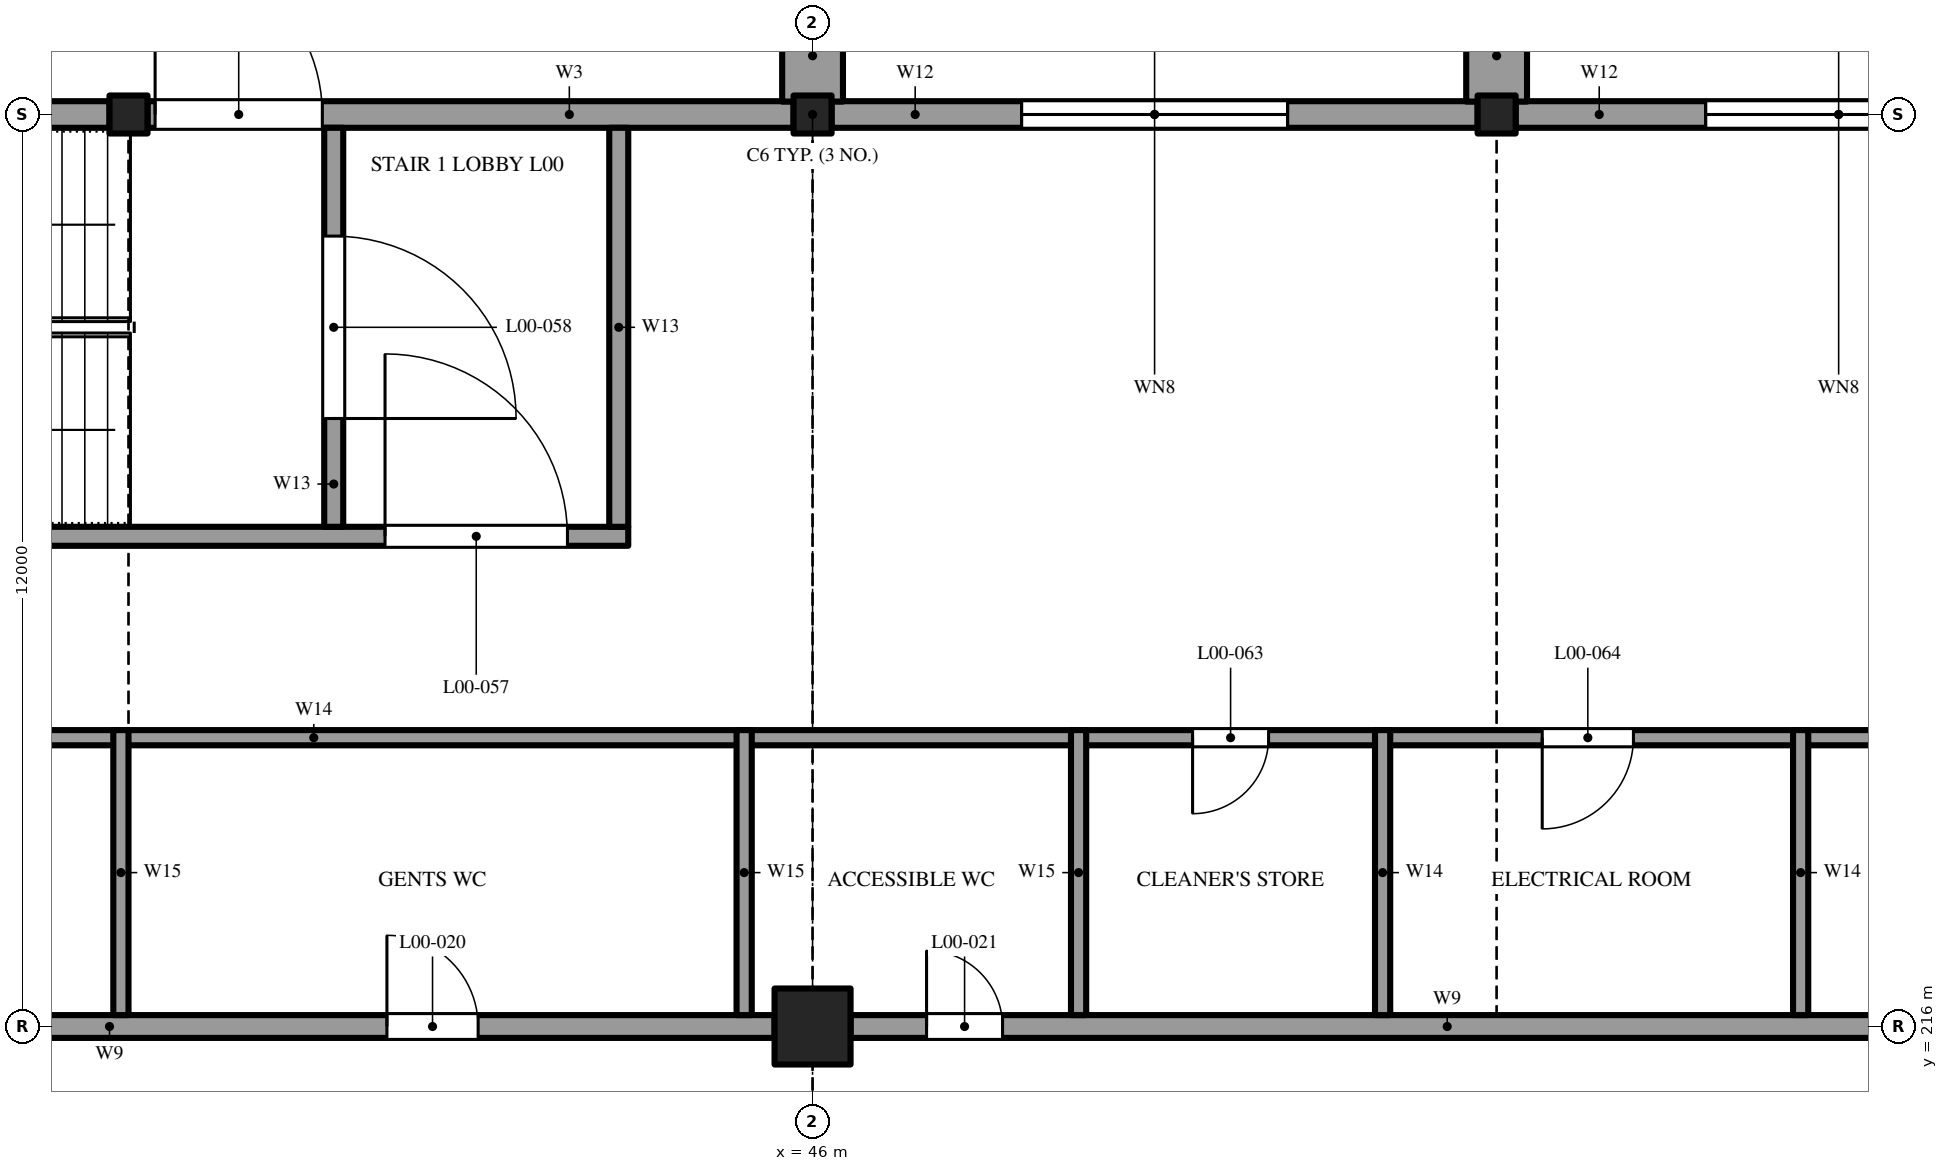
"""IFC4 building model, lengths in metres.
Left out: names, types, materials, properties, quantities, classifications, styles, units other than length and angle.
Written with IfcOpenShell. Run it as: python <this file> out.ifc"""

import sys

from ifc_helpers import new_model, si_unit, direction, frame, frame_2d, origin, origin_2d, place, context, subcontext, project, spatial, rectangle, extrude, element, fill, save


model = new_model("IFC4")
c1 = context("Model", 3, precision=1e-05, world=origin(), true_north=direction((0.0, 1.0)))
c2 = subcontext(c1, "Body", "Model", "MODEL_VIEW")
j1 = project(units=[si_unit("LENGTHUNIT", "METRE"), si_unit("PLANEANGLEUNIT", "RADIAN")], contexts=[c1])
p1 = place(None, origin())
s1 = spatial("IfcSite", under=j1, at=p1, CompositionType="ELEMENT")
p2 = place(p1, origin())
s2 = spatial("IfcBuilding", under=s1, at=p2, CompositionType="ELEMENT")
p3 = place(p2, origin())
s3 = spatial("IfcBuildingStorey", under=s2, at=p3, CompositionType="ELEMENT", Elevation=0.0)
p4 = place(p3, frame((46.0, 216.0, -0.4), z_axis=(0.0, 0.0, 1.0), x_axis=(1.0, 0.0, 0.0)))
e1 = element("IfcColumn", 1, at=p4, inside=s3, PredefinedType="COLUMN", context=c2, shape_type="SweptSolid", body=[
    extrude(rectangle(XDim=1.0, YDim=1.0, at=origin_2d()), origin(), (0.0, 0.0, 1.0), 7.6),
])
for number, where, z_axis, x_axis in (
    (2, (37.0, 228.0, -0.4), (0.0, 0.0, 1.0), (1.0, 0.0, 0.0)),
    (3, (46.0, 228.0, -0.4), (0.0, 0.0, 1.0), (1.0, 0.0, 0.0)),
    (4, (55.0, 228.0, -0.4), (0.0, 0.0, 1.0), (1.0, 0.0, 0.0)),
):
    element("IfcColumn", number, at=place(p3, frame(where, z_axis=z_axis, x_axis=x_axis)), inside=s3, PredefinedType="COLUMN", context=c2, shape_type="SweptSolid", body=[
        extrude(rectangle(XDim=0.5, YDim=0.5, at=origin_2d()), origin(), (0.0, 0.0, 1.0), 7.6),
    ])
p5 = place(p3, frame((28.5, 216.0, 0.0), z_axis=(0.0, 0.0, 1.0), x_axis=(1.0, 0.0, 0.0)))
e5 = element("IfcWall", 5, at=p5, inside=s3, PredefinedType="SOLIDWALL", context=c2, shape_type="SweptSolid", body=[
    extrude(rectangle(XDim=17.0, YDim=0.3, at=frame_2d((8.5, 0.0))), origin(), (0.0, 0.0, 1.0), 6.8),
])
p6 = place(p5, frame((3.4, 0.0, 0.0)))
e6 = element("IfcOpeningElement", 6, at=p6, cuts=e5, PredefinedType="OPENING", context=c2, shape_type="SweptSolid", body=[
    extrude(rectangle(XDim=1.2, YDim=2.2, at=frame_2d((0.6, 1.1))), frame((0.0, 0.16, 0.0), z_axis=(0.0, -1.0, 0.0), x_axis=(1.0, 0.0, 0.0)), (0.0, 0.0, 1.0), 0.32),
])
p7 = place(p5, frame((11.9, 0.0, 0.0)))
e7 = element("IfcOpeningElement", 7, at=p7, cuts=e5, PredefinedType="OPENING", context=c2, shape_type="SweptSolid", body=[
    extrude(rectangle(XDim=1.2, YDim=2.2, at=frame_2d((0.6, 1.1))), frame((0.0, 0.16, 0.0), z_axis=(0.0, -1.0, 0.0), x_axis=(1.0, 0.0, 0.0)), (0.0, 0.0, 1.0), 0.32),
])
p8 = place(p3, frame((46.5, 216.0, 0.0), z_axis=(0.0, 0.0, 1.0), x_axis=(1.0, 0.0, 0.0)))
e8 = element("IfcWall", 8, at=p8, inside=s3, PredefinedType="SOLIDWALL", context=c2, shape_type="SweptSolid", body=[
    extrude(rectangle(XDim=17.0, YDim=0.3, at=frame_2d((8.5, 0.0))), origin(), (0.0, 0.0, 1.0), 6.8),
])
p9 = place(p8, frame((1.0, 0.0, 0.0)))
e9 = element("IfcOpeningElement", 9, at=p9, cuts=e8, PredefinedType="OPENING", context=c2, shape_type="SweptSolid", body=[
    extrude(rectangle(XDim=1.0, YDim=2.2, at=frame_2d((0.5, 1.1))), frame((0.0, 0.16, 0.0), z_axis=(0.0, -1.0, 0.0), x_axis=(1.0, 0.0, 0.0)), (0.0, 0.0, 1.0), 0.32),
])
p10 = place(p8, frame((13.7, 0.0, 0.0)))
e10 = element("IfcOpeningElement", 10, at=p10, cuts=e8, PredefinedType="OPENING", context=c2, shape_type="SweptSolid", body=[
    extrude(rectangle(XDim=1.2, YDim=2.2, at=frame_2d((0.6, 1.1))), frame((0.0, 0.16, 0.0), z_axis=(0.0, -1.0, 0.0), x_axis=(1.0, 0.0, 0.0)), (0.0, 0.0, 1.0), 0.32),
])
p11 = place(p3, frame((28.25, 228.0, 0.0), z_axis=(0.0, 0.0, 1.0), x_axis=(1.0, 0.0, 0.0)))
e11 = element("IfcWall", 11, at=p11, inside=s3, PredefinedType="SOLIDWALL", context=c2, shape_type="SweptSolid", body=[
    extrude(rectangle(XDim=8.5, YDim=0.35, at=frame_2d((4.25, 0.0))), origin(), (0.0, 0.0, 1.0), 6.8),
])
p12 = place(p3, frame((37.25, 228.0, 0.0), z_axis=(0.0, 0.0, 1.0), x_axis=(1.0, 0.0, 0.0)))
e12 = element("IfcWall", 12, at=p12, inside=s3, PredefinedType="SOLIDWALL", context=c2, shape_type="SweptSolid", body=[
    extrude(rectangle(XDim=8.5, YDim=0.35, at=frame_2d((4.25, 0.0))), origin(), (0.0, 0.0, 1.0), 6.8),
])
p13 = place(p12, frame((0.1, 0.0, 0.0)))
e13 = element("IfcOpeningElement", 13, at=p13, cuts=e12, PredefinedType="OPENING", context=c2, shape_type="SweptSolid", body=[
    extrude(rectangle(XDim=2.2, YDim=2.2, at=frame_2d((1.1, 1.1))), frame((0.0, 0.185, 0.0), z_axis=(0.0, -1.0, 0.0), x_axis=(1.0, 0.0, 0.0)), (0.0, 0.0, 1.0), 0.37),
])
p14 = place(p3, frame((46.25, 228.0, 0.0), z_axis=(0.0, 0.0, 1.0), x_axis=(1.0, 0.0, 0.0)))
e14 = element("IfcWall", 14, at=p14, inside=s3, PredefinedType="SOLIDWALL", context=c2, shape_type="SweptSolid", body=[
    extrude(rectangle(XDim=8.5, YDim=0.35, at=frame_2d((4.25, 0.0))), origin(), (0.0, 0.0, 1.0), 6.8),
])
p15 = place(p14, frame((2.5, 0.0, 0.0)))
e15 = element("IfcOpeningElement", 15, at=p15, cuts=e14, PredefinedType="OPENING", context=c2, shape_type="SweptSolid", body=[
    extrude(rectangle(XDim=3.5, YDim=4.2, at=frame_2d((1.75, 2.1))), frame((0.0, 0.185, 0.0), z_axis=(0.0, -1.0, 0.0), x_axis=(1.0, 0.0, 0.0)), (0.0, 0.0, 1.0), 0.37),
])
p16 = place(p14, frame((2.5, 0.0, 4.9)))
e16 = element("IfcOpeningElement", 16, at=p16, cuts=e14, PredefinedType="OPENING", context=c2, shape_type="SweptSolid", body=[
    extrude(rectangle(XDim=3.5, YDim=1.7, at=frame_2d((1.75, 0.85))), frame((0.0, 0.185, 0.0), z_axis=(0.0, -1.0, 0.0), x_axis=(1.0, 0.0, 0.0)), (0.0, 0.0, 1.0), 0.37),
])
p17 = place(p3, frame((55.25, 228.0, 0.0), z_axis=(0.0, 0.0, 1.0), x_axis=(1.0, 0.0, 0.0)))
e17 = element("IfcWall", 17, at=p17, inside=s3, PredefinedType="SOLIDWALL", context=c2, shape_type="SweptSolid", body=[
    extrude(rectangle(XDim=8.5, YDim=0.35, at=frame_2d((4.25, 0.0))), origin(), (0.0, 0.0, 1.0), 6.8),
])
p18 = place(p17, frame((2.5, 0.0, 0.0)))
e18 = element("IfcOpeningElement", 18, at=p18, cuts=e17, PredefinedType="OPENING", context=c2, shape_type="SweptSolid", body=[
    extrude(rectangle(XDim=3.5, YDim=4.2, at=frame_2d((1.75, 2.1))), frame((0.0, 0.185, 0.0), z_axis=(0.0, -1.0, 0.0), x_axis=(1.0, 0.0, 0.0)), (0.0, 0.0, 1.0), 0.37),
])
p19 = place(p17, frame((2.5, 0.0, 4.9)))
e19 = element("IfcOpeningElement", 19, at=p19, cuts=e17, PredefinedType="OPENING", context=c2, shape_type="SweptSolid", body=[
    extrude(rectangle(XDim=3.5, YDim=1.7, at=frame_2d((1.75, 0.85))), frame((0.0, 0.185, 0.0), z_axis=(0.0, -1.0, 0.0), x_axis=(1.0, 0.0, 0.0)), (0.0, 0.0, 1.0), 0.37),
])
p20 = place(p3, frame((28.175, 222.45, 0.0), z_axis=(0.0, 0.0, 1.0), x_axis=(1.0, 0.0, 0.0)))
e20 = element("IfcWall", 20, at=p20, inside=s3, PredefinedType="SOLIDWALL", context=c2, shape_type="SweptSolid", body=[
    extrude(rectangle(XDim=15.4, YDim=0.25, at=frame_2d((7.7, 0.0))), origin(), (0.0, 0.0, 1.0), 6.8),
])
p21 = place(p20, frame((12.2, 0.0, 0.0)))
e21 = element("IfcOpeningElement", 21, at=p21, cuts=e20, PredefinedType="OPENING", context=c2, shape_type="SweptSolid", body=[
    extrude(rectangle(XDim=2.4, YDim=2.2, at=frame_2d((1.2, 1.1))), frame((0.0, 0.135, 0.0), z_axis=(0.0, -1.0, 0.0), x_axis=(1.0, 0.0, 0.0)), (0.0, 0.0, 1.0), 0.27),
])
p22 = place(p3, frame((39.7, 222.575, 0.0), z_axis=(0.0, 0.0, 1.0), x_axis=(0.0, 1.0, 0.0)))
e22 = element("IfcWall", 22, at=p22, inside=s3, PredefinedType="SOLIDWALL", context=c2, shape_type="SweptSolid", body=[
    extrude(rectangle(XDim=5.25, YDim=0.25, at=frame_2d((2.625, 0.0))), origin(), (0.0, 0.0, 1.0), 6.8),
])
p23 = place(p22, frame((1.425, 0.0, 0.0)))
e23 = element("IfcOpeningElement", 23, at=p23, cuts=e22, PredefinedType="OPENING", context=c2, shape_type="SweptSolid", body=[
    extrude(rectangle(XDim=2.4, YDim=2.2, at=frame_2d((1.2, 1.1))), frame((0.0, 0.135, 0.0), z_axis=(0.0, -1.0, 0.0), x_axis=(1.0, 0.0, 0.0)), (0.0, 0.0, 1.0), 0.27),
])
p24 = place(p3, frame((43.45, 222.575, 0.0), z_axis=(0.0, 0.0, 1.0), x_axis=(0.0, 1.0, 0.0)))
e24 = element("IfcWall", 24, at=p24, inside=s3, PredefinedType="SOLIDWALL", context=c2, shape_type="SweptSolid", body=[
    extrude(rectangle(XDim=5.25, YDim=0.25, at=frame_2d((2.625, 0.0))), origin(), (0.0, 0.0, 1.0), 6.8),
])
for number, where, z_axis, x_axis in (
    (25, (46.0, 228.17, -0.4), (0.0, 0.0, 1.0), (0.0, 1.0, 0.0)),
    (26, (55.0, 228.17, -0.4), (0.0, 0.0, 1.0), (0.0, 1.0, 0.0)),
):
    element("IfcWall", number, at=place(p3, frame(where, z_axis=z_axis, x_axis=x_axis)), inside=s3, PredefinedType="SOLIDWALL", context=c2, shape_type="SweptSolid", body=[
        extrude(rectangle(XDim=1.205, YDim=0.8, at=frame_2d((0.603, 0.0))), origin(), (0.0, 0.0, 1.0), 7.6),
    ])
p25 = place(p3, frame((28.175, 219.8, 0.0), z_axis=(0.0, 0.0, 1.0), x_axis=(1.0, 0.0, 0.0)))
e27 = element("IfcWall", 27, at=p25, inside=s3, PredefinedType="SOLIDWALL", context=c2, shape_type="SweptSolid", body=[
    extrude(rectangle(XDim=37.125, YDim=0.2, at=frame_2d((18.562, 0.0))), origin(), (0.0, 0.0, 1.0), 6.8),
])
p26 = place(p25, frame((22.825, 0.0, 0.0)))
e28 = element("IfcOpeningElement", 28, at=p26, cuts=e27, PredefinedType="OPENING", context=c2, shape_type="SweptSolid", body=[
    extrude(rectangle(XDim=1.0, YDim=2.1, at=frame_2d((0.5, 1.05))), frame((0.0, 0.11, 0.0), z_axis=(0.0, -1.0, 0.0), x_axis=(1.0, 0.0, 0.0)), (0.0, 0.0, 1.0), 0.22),
])
p27 = place(p25, frame((27.425, 0.0, 0.0)))
e29 = element("IfcOpeningElement", 29, at=p27, cuts=e27, PredefinedType="OPENING", context=c2, shape_type="SweptSolid", body=[
    extrude(rectangle(XDim=1.2, YDim=2.1, at=frame_2d((0.6, 1.05))), frame((0.0, 0.11, 0.0), z_axis=(0.0, -1.0, 0.0), x_axis=(1.0, 0.0, 0.0)), (0.0, 0.0, 1.0), 0.22),
])
p28 = place(p25, frame((33.425, 0.0, 0.0)))
e30 = element("IfcOpeningElement", 30, at=p28, cuts=e27, PredefinedType="OPENING", context=c2, shape_type="SweptSolid", body=[
    extrude(rectangle(XDim=1.2, YDim=2.1, at=frame_2d((0.6, 1.05))), frame((0.0, 0.11, 0.0), z_axis=(0.0, -1.0, 0.0), x_axis=(1.0, 0.0, 0.0)), (0.0, 0.0, 1.0), 0.22),
])
for number, where, z_axis, x_axis in (
    (31, (36.9, 216.15, 0.0), (0.0, 0.0, 1.0), (0.0, 1.0, 0.0)),
    (32, (45.1, 216.15, 0.0), (0.0, 0.0, 1.0), (0.0, 1.0, 0.0)),
    (33, (49.5, 216.15, 0.0), (0.0, 0.0, 1.0), (0.0, 1.0, 0.0)),
):
    element("IfcWall", number, at=place(p3, frame(where, z_axis=z_axis, x_axis=x_axis)), inside=s3, PredefinedType="PARTITIONING", context=c2, shape_type="SweptSolid", body=[
        extrude(rectangle(XDim=3.75, YDim=0.2, at=frame_2d((1.875, 0.0))), origin(), (0.0, 0.0, 1.0), 6.8),
    ])
for number, where, z_axis, x_axis in (
    (34, (53.5, 216.15, 0.0), (0.0, 0.0, 1.0), (0.0, 1.0, 0.0)),
    (35, (59.0, 216.15, 0.0), (0.0, 0.0, 1.0), (0.0, 1.0, 0.0)),
):
    element("IfcWall", number, at=place(p3, frame(where, z_axis=z_axis, x_axis=x_axis)), inside=s3, PredefinedType="SOLIDWALL", context=c2, shape_type="SweptSolid", body=[
        extrude(rectangle(XDim=3.75, YDim=0.2, at=frame_2d((1.875, 0.0))), origin(), (0.0, 0.0, 1.0), 6.8),
    ])
p29 = place(p7, origin())
e36 = element("IfcDoor", 36, at=p29, inside=s3, OperationType="SINGLE_SWING_RIGHT", PredefinedType="DOOR", context=c2, shape_type="SweptSolid", body=[
    extrude(rectangle(XDim=1.2, YDim=2.2, at=frame_2d((0.6, 1.1))), frame((0.0, 0.025, 0.0), z_axis=(0.0, -1.0, 0.0), x_axis=(1.0, 0.0, 0.0)), (0.0, 0.0, 1.0), 0.05),
])
fill(e7, e36)
p30 = place(p9, origin())
e37 = element("IfcDoor", 37, at=p30, inside=s3, OperationType="SINGLE_SWING_LEFT", PredefinedType="DOOR", context=c2, shape_type="SweptSolid", body=[
    extrude(rectangle(XDim=1.0, YDim=2.2, at=frame_2d((0.5, 1.1))), frame((0.0, 0.025, 0.0), z_axis=(0.0, -1.0, 0.0), x_axis=(1.0, 0.0, 0.0)), (0.0, 0.0, 1.0), 0.05),
])
fill(e9, e37)
p31 = place(p15, origin())
e38 = element("IfcDoor", 38, at=p31, inside=s3, OperationType="ROLLINGUP", PredefinedType="DOOR", context=c2, shape_type="SweptSolid", body=[
    extrude(rectangle(XDim=3.5, YDim=4.2, at=frame_2d((1.75, 2.1))), frame((0.0, 0.025, 0.0), z_axis=(0.0, -1.0, 0.0), x_axis=(1.0, 0.0, 0.0)), (0.0, 0.0, 1.0), 0.05),
])
fill(e15, e38)
p32 = place(p16, origin())
e39 = element("IfcWindow", 39, at=p32, inside=s3, PartitioningType="SINGLE_PANEL", PredefinedType="WINDOW", context=c2, shape_type="SweptSolid", body=[
    extrude(rectangle(XDim=3.5, YDim=1.7, at=frame_2d((1.75, 0.85))), frame((0.0, 0.03, 0.0), z_axis=(0.0, -1.0, 0.0), x_axis=(1.0, 0.0, 0.0)), (0.0, 0.0, 1.0), 0.06),
])
fill(e16, e39)
p33 = place(p18, origin())
e40 = element("IfcDoor", 40, at=p33, inside=s3, OperationType="ROLLINGUP", PredefinedType="DOOR", context=c2, shape_type="SweptSolid", body=[
    extrude(rectangle(XDim=3.5, YDim=4.2, at=frame_2d((1.75, 2.1))), frame((0.0, 0.025, 0.0), z_axis=(0.0, -1.0, 0.0), x_axis=(1.0, 0.0, 0.0)), (0.0, 0.0, 1.0), 0.05),
])
fill(e18, e40)
p34 = place(p19, origin())
e41 = element("IfcWindow", 41, at=p34, inside=s3, PartitioningType="SINGLE_PANEL", PredefinedType="WINDOW", context=c2, shape_type="SweptSolid", body=[
    extrude(rectangle(XDim=3.5, YDim=1.7, at=frame_2d((1.75, 0.85))), frame((0.0, 0.03, 0.0), z_axis=(0.0, -1.0, 0.0), x_axis=(1.0, 0.0, 0.0)), (0.0, 0.0, 1.0), 0.06),
])
fill(e19, e41)
p35 = place(p13, origin())
e42 = element("IfcDoor", 42, at=p35, inside=s3, OperationType="DOUBLE_DOOR_SINGLE_SWING", PredefinedType="DOOR", context=c2, shape_type="SweptSolid", body=[
    extrude(rectangle(XDim=2.2, YDim=2.2, at=frame_2d((1.1, 1.1))), frame((0.0, 0.025, 0.0), z_axis=(0.0, -1.0, 0.0), x_axis=(1.0, 0.0, 0.0)), (0.0, 0.0, 1.0), 0.05),
])
fill(e13, e42)
p36 = place(p21, origin())
e43 = element("IfcDoor", 43, at=p36, inside=s3, OperationType="DOUBLE_DOOR_SINGLE_SWING", PredefinedType="DOOR", context=c2, shape_type="SweptSolid", body=[
    extrude(rectangle(XDim=2.4, YDim=2.2, at=frame_2d((1.2, 1.1))), frame((0.0, 0.025, 0.0), z_axis=(0.0, -1.0, 0.0), x_axis=(1.0, 0.0, 0.0)), (0.0, 0.0, 1.0), 0.05),
])
fill(e21, e43)
p37 = place(p23, frame((2.4, 0.0, 0.0), z_axis=(0.0, 0.0, 1.0), x_axis=(-1.0, 0.0, 0.0)))
e44 = element("IfcDoor", 44, at=p37, inside=s3, OperationType="DOUBLE_DOOR_SINGLE_SWING", PredefinedType="DOOR", context=c2, shape_type="SweptSolid", body=[
    extrude(rectangle(XDim=2.4, YDim=2.2, at=frame_2d((1.2, 1.1))), frame((0.0, 0.025, 0.0), z_axis=(0.0, -1.0, 0.0), x_axis=(1.0, 0.0, 0.0)), (0.0, 0.0, 1.0), 0.05),
])
fill(e23, e44)
p38 = place(p26, frame((1.0, 0.0, 0.0), z_axis=(0.0, 0.0, 1.0), x_axis=(-1.0, 0.0, 0.0)))
e45 = element("IfcDoor", 45, at=p38, inside=s3, OperationType="SINGLE_SWING_RIGHT", PredefinedType="DOOR", context=c2, shape_type="SweptSolid", body=[
    extrude(rectangle(XDim=1.0, YDim=2.1, at=frame_2d((0.5, 1.05))), frame((0.0, 0.025, 0.0), z_axis=(0.0, -1.0, 0.0), x_axis=(1.0, 0.0, 0.0)), (0.0, 0.0, 1.0), 0.05),
])
fill(e28, e45)
p39 = place(p27, frame((1.2, 0.0, 0.0), z_axis=(0.0, 0.0, 1.0), x_axis=(-1.0, 0.0, 0.0)))
e46 = element("IfcDoor", 46, at=p39, inside=s3, OperationType="SINGLE_SWING_LEFT", PredefinedType="DOOR", context=c2, shape_type="SweptSolid", body=[
    extrude(rectangle(XDim=1.2, YDim=2.1, at=frame_2d((0.6, 1.05))), frame((0.0, 0.025, 0.0), z_axis=(0.0, -1.0, 0.0), x_axis=(1.0, 0.0, 0.0)), (0.0, 0.0, 1.0), 0.05),
])
fill(e29, e46)
save(model, sys.argv[1])
